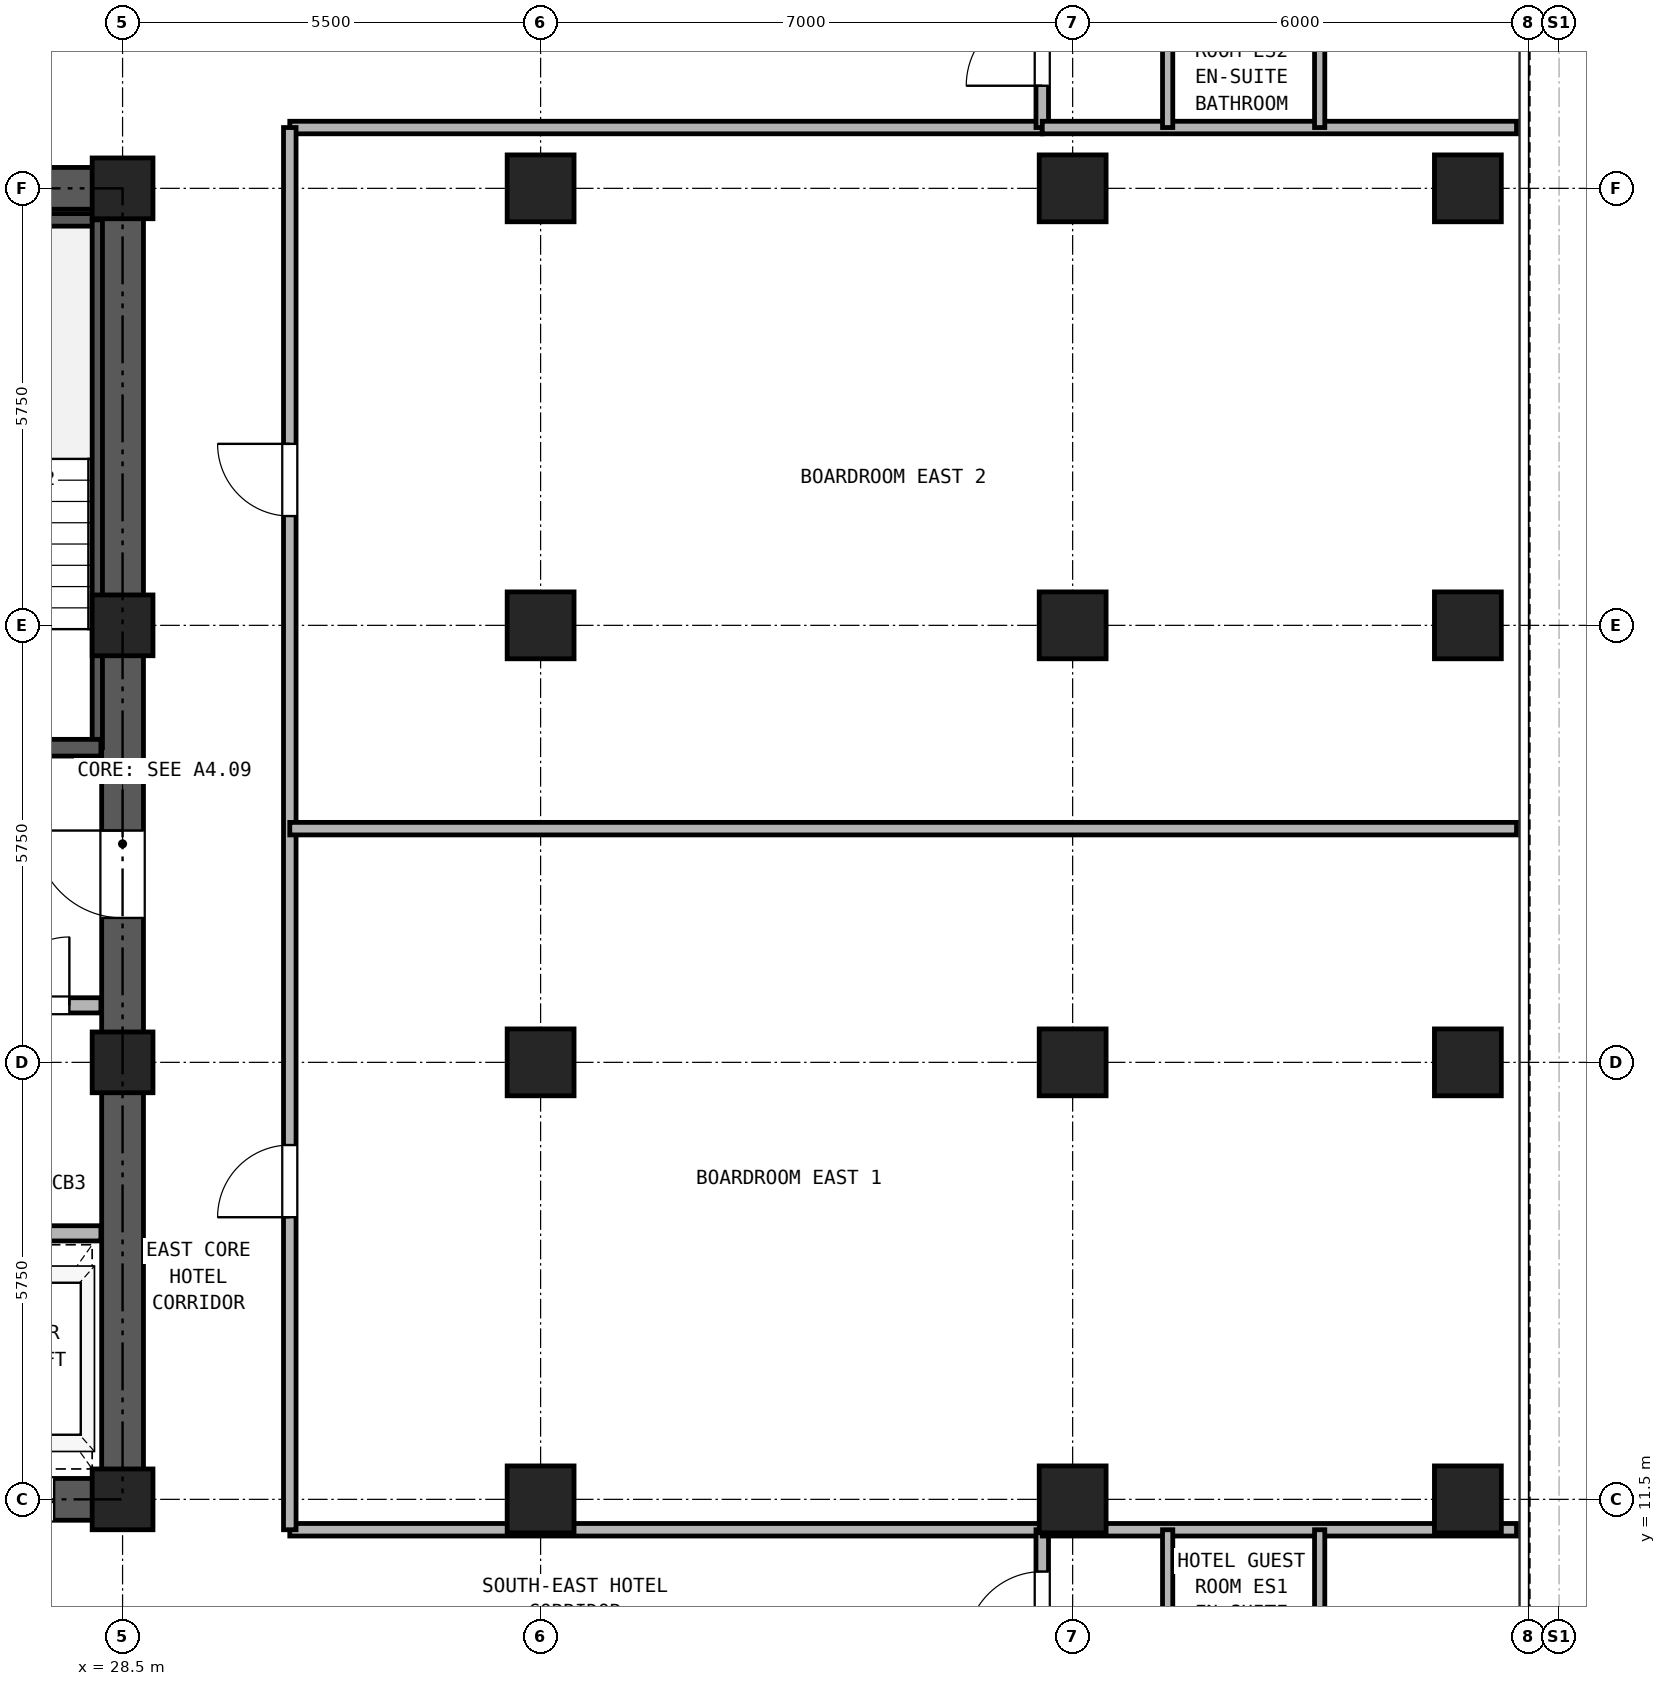
"""IFC4 building model, lengths in metres.
Left out: names, types, materials, properties, quantities, classifications, styles, units other than length and angle.
Written with IfcOpenShell. Run it as: python <this file> out.ifc"""

import sys

from ifc_helpers import new_model, si_unit, direction, frame, frame_2d, origin, origin_2d, place, context, subcontext, project, spatial, rectangle, hollow_rectangle, extrude, source, transform, mapped, element, fill, save


model = new_model("IFC4")
c1 = context("Model", 3, precision=1e-05, world=origin(), true_north=direction((0.0, 1.0)))
c2 = subcontext(c1, "Body", "Model", "MODEL_VIEW")
j1 = project(units=[si_unit("LENGTHUNIT", "METRE"), si_unit("PLANEANGLEUNIT", "RADIAN")], contexts=[c1])
p1 = place(None, origin())
s1 = spatial("IfcSite", under=j1, at=p1, CompositionType="ELEMENT")
p2 = place(p1, origin())
s2 = spatial("IfcBuilding", under=s1, at=p2, CompositionType="ELEMENT")
p3 = place(p2, frame((0.0, 0.0, 108.7)))
s3 = spatial("IfcBuildingStorey", under=s2, at=p3, CompositionType="ELEMENT", Elevation=108.7)
m1 = source(origin(), c2, "Body", "SweptSolid", [
    extrude(hollow_rectangle(XDim=0.88, YDim=0.88, WallThickness=0.05, at=origin_2d()), origin(), (0.0, 0.0, 1.0), 2.95),
])
for number, where, z_axis, x_axis in (
    (1, (46.2, 11.5, 0.0), (0.0, 0.0, 1.0), (1.0, 0.0, 0.0)),
    (2, (46.2, 17.25, 0.0), (0.0, 0.0, 1.0), (1.0, 0.0, 0.0)),
    (3, (46.2, 23.0, 0.0), (0.0, 0.0, 1.0), (1.0, 0.0, 0.0)),
    (4, (46.2, 28.75, 0.0), (0.0, 0.0, 1.0), (1.0, 0.0, 0.0)),
):
    element("IfcColumn", number, at=place(p3, frame(where, z_axis=z_axis, x_axis=x_axis)), inside=s3, PredefinedType="COLUMN", context=c2, shape_type="MappedRepresentation", body=[
        mapped(m1, transform((0.0, 0.0, 0.0), x_axis=(1.0, 0.0, 0.0), y_axis=(0.0, 1.0, 0.0), z_axis=(0.0, 0.0, 1.0), scale=1.0)),
    ])
m2 = source(origin(), c2, "Body", "SweptSolid", [
    extrude(hollow_rectangle(XDim=0.8, YDim=0.8, WallThickness=0.045, at=origin_2d()), origin(), (0.0, 0.0, 1.0), 2.95),
])
for number, where, z_axis, x_axis in (
    (5, (28.5, 11.5, 0.0), (0.0, 0.0, 1.0), (1.0, 0.0, 0.0)),
    (6, (28.5, 17.25, 0.0), (0.0, 0.0, 1.0), (1.0, 0.0, 0.0)),
    (7, (28.5, 23.0, 0.0), (0.0, 0.0, 1.0), (1.0, 0.0, 0.0)),
    (8, (28.5, 28.75, 0.0), (0.0, 0.0, 1.0), (1.0, 0.0, 0.0)),
):
    element("IfcColumn", number, at=place(p3, frame(where, z_axis=z_axis, x_axis=x_axis)), inside=s3, PredefinedType="COLUMN", context=c2, shape_type="MappedRepresentation", body=[
        mapped(m2, transform((0.0, 0.0, 0.0), x_axis=(1.0, 0.0, 0.0), y_axis=(0.0, 1.0, 0.0), z_axis=(0.0, 0.0, 1.0), scale=1.0)),
    ])
for number, where, z_axis, x_axis in (
    (9, (34.0, 11.5, 0.0), (0.0, 0.0, 1.0), (1.0, 0.0, 0.0)),
    (10, (34.0, 17.25, 0.0), (0.0, 0.0, 1.0), (1.0, 0.0, 0.0)),
    (11, (34.0, 23.0, 0.0), (0.0, 0.0, 1.0), (1.0, 0.0, 0.0)),
    (12, (34.0, 28.75, 0.0), (0.0, 0.0, 1.0), (1.0, 0.0, 0.0)),
    (13, (41.0, 11.5, 0.0), (0.0, 0.0, 1.0), (1.0, 0.0, 0.0)),
    (14, (41.0, 17.25, 0.0), (0.0, 0.0, 1.0), (1.0, 0.0, 0.0)),
    (15, (41.0, 23.0, 0.0), (0.0, 0.0, 1.0), (1.0, 0.0, 0.0)),
    (16, (41.0, 28.75, 0.0), (0.0, 0.0, 1.0), (1.0, 0.0, 0.0)),
):
    element("IfcColumn", number, at=place(p3, frame(where, z_axis=z_axis, x_axis=x_axis)), inside=s3, PredefinedType="COLUMN", context=c2, shape_type="MappedRepresentation", body=[
        mapped(m1, transform((0.0, 0.0, 0.0), x_axis=(1.0, 0.0, 0.0), y_axis=(0.0, 1.0, 0.0), z_axis=(0.0, 0.0, 1.0), scale=1.0)),
    ])
p4 = place(p3, frame((18.225, 11.5, 0.0), z_axis=(0.0, 0.0, 1.0), x_axis=(1.0, 0.0, 0.0)))
e17 = element("IfcWall", 17, at=p4, inside=s3, PredefinedType="SHEAR", context=c2, shape_type="SweptSolid", body=[
    extrude(rectangle(XDim=10.55, YDim=0.55, at=frame_2d((5.275, 0.0))), origin(), (0.0, 0.0, 1.0), 2.95),
])
p5 = place(p4, frame((2.375, 0.0, 0.0)))
e18 = element("IfcOpeningElement", 18, at=p5, cuts=e17, PredefinedType="OPENING", context=c2, shape_type="SweptSolid", body=[
    extrude(rectangle(XDim=0.95, YDim=2.15, at=frame_2d((0.475, 1.075))), frame((0.0, 0.285, 0.0), z_axis=(0.0, -1.0, 0.0), x_axis=(1.0, 0.0, 0.0)), (0.0, 0.0, 1.0), 0.57),
])
p6 = place(p4, frame((5.875, 0.0, 0.0)))
e19 = element("IfcOpeningElement", 19, at=p6, cuts=e17, PredefinedType="OPENING", context=c2, shape_type="SweptSolid", body=[
    extrude(rectangle(XDim=1.1, YDim=2.25, at=frame_2d((0.55, 1.125))), frame((0.0, 0.285, 0.0), z_axis=(0.0, -1.0, 0.0), x_axis=(1.0, 0.0, 0.0)), (0.0, 0.0, 1.0), 0.57),
])
p7 = place(p4, frame((8.275, 0.0, 0.0)))
e20 = element("IfcOpeningElement", 20, at=p7, cuts=e17, PredefinedType="OPENING", context=c2, shape_type="SweptSolid", body=[
    extrude(rectangle(XDim=1.1, YDim=2.25, at=frame_2d((0.55, 1.125))), frame((0.0, 0.285, 0.0), z_axis=(0.0, -1.0, 0.0), x_axis=(1.0, 0.0, 0.0)), (0.0, 0.0, 1.0), 0.57),
])
p8 = place(p3, frame((18.225, 28.75, 0.0), z_axis=(0.0, 0.0, 1.0), x_axis=(1.0, 0.0, 0.0)))
e21 = element("IfcWall", 21, at=p8, inside=s3, PredefinedType="SHEAR", context=c2, shape_type="SweptSolid", body=[
    extrude(rectangle(XDim=10.55, YDim=0.55, at=frame_2d((5.275, 0.0))), origin(), (0.0, 0.0, 1.0), 2.95),
])
p9 = place(p8, frame((4.155, 0.0, 0.0)))
e22 = element("IfcOpeningElement", 22, at=p9, cuts=e21, PredefinedType="OPENING", context=c2, shape_type="SweptSolid", body=[
    extrude(rectangle(XDim=0.9, YDim=2.05, at=frame_2d((0.45, 1.025))), frame((0.0, 0.285, 0.0), z_axis=(0.0, -1.0, 0.0), x_axis=(1.0, 0.0, 0.0)), (0.0, 0.0, 1.0), 0.57),
])
p10 = place(p8, frame((5.695, 0.0, 0.0)))
e23 = element("IfcOpeningElement", 23, at=p10, cuts=e21, PredefinedType="OPENING", context=c2, shape_type="SweptSolid", body=[
    extrude(rectangle(XDim=0.9, YDim=2.05, at=frame_2d((0.45, 1.025))), frame((0.0, 0.285, 0.0), z_axis=(0.0, -1.0, 0.0), x_axis=(1.0, 0.0, 0.0)), (0.0, 0.0, 1.0), 0.57),
])
p11 = place(p3, frame((28.5, 11.775, 0.0), z_axis=(0.0, 0.0, 1.0), x_axis=(0.0, 1.0, 0.0)))
e24 = element("IfcWall", 24, at=p11, inside=s3, PredefinedType="SHEAR", context=c2, shape_type="SweptSolid", body=[
    extrude(rectangle(XDim=16.7, YDim=0.55, at=frame_2d((8.35, 0.0))), origin(), (0.0, 0.0, 1.0), 2.95),
])
p12 = place(p11, frame((7.375, 0.0, 0.0)))
e25 = element("IfcOpeningElement", 25, at=p12, cuts=e24, PredefinedType="OPENING", context=c2, shape_type="SweptSolid", body=[
    extrude(rectangle(XDim=1.15, YDim=2.2, at=frame_2d((0.575, 1.1))), frame((0.0, 0.285, 0.0), z_axis=(0.0, -1.0, 0.0), x_axis=(1.0, 0.0, 0.0)), (0.0, 0.0, 1.0), 0.57),
])
p13 = place(p3, frame((25.13, 28.335, 0.0), z_axis=(0.0, 0.0, 1.0), x_axis=(1.0, 0.0, 0.0)))
e26 = element("IfcWall", 26, at=p13, inside=s3, PredefinedType="PARTITIONING", context=c2, shape_type="SweptSolid", body=[
    extrude(rectangle(XDim=3.085, YDim=0.165, at=frame_2d((1.542, 0.0))), origin(), (0.0, 0.0, 1.0), 2.95),
])
p14 = place(p3, frame((28.167, 21.39, 0.0), z_axis=(0.0, 0.0, 1.0), x_axis=(0.0, 1.0, 0.0)))
e27 = element("IfcWall", 27, at=p14, inside=s3, PredefinedType="PARTITIONING", context=c2, shape_type="SweptSolid", body=[
    extrude(rectangle(XDim=6.945, YDim=0.135, at=frame_2d((3.473, 0.0))), origin(), (0.0, 0.0, 1.0), 2.95),
])
p15 = place(p3, frame((25.13, 21.39, 0.0), z_axis=(0.0, 0.0, 1.0), x_axis=(1.0, 0.0, 0.0)))
e28 = element("IfcWall", 28, at=p15, inside=s3, PredefinedType="SOLIDWALL", context=c2, shape_type="SweptSolid", body=[
    extrude(rectangle(XDim=3.085, YDim=0.22, at=frame_2d((1.542, 0.0))), origin(), (0.0, 0.0, 1.0), 2.95),
])
p16 = place(p15, frame((0.92, 0.0, 0.0)))
e29 = element("IfcOpeningElement", 29, at=p16, cuts=e28, PredefinedType="OPENING", context=c2, shape_type="SweptSolid", body=[
    extrude(rectangle(XDim=1.15, YDim=2.2, at=frame_2d((0.575, 1.1))), frame((0.0, 0.12, 0.0), z_axis=(0.0, -1.0, 0.0), x_axis=(1.0, 0.0, 0.0)), (0.0, 0.0, 1.0), 0.24),
])
p17 = place(p3, frame((18.785, 18.0, 0.0), z_axis=(0.0, 0.0, 1.0), x_axis=(1.0, 0.0, 0.0)))
e30 = element("IfcWall", 30, at=p17, inside=s3, PredefinedType="PARTITIONING", context=c2, shape_type="SweptSolid", body=[
    extrude(rectangle(XDim=9.43, YDim=0.2, at=frame_2d((4.715, 0.0))), origin(), (0.0, 0.0, 1.0), 2.95),
])
p18 = place(p17, frame((0.465, 0.0, 0.0)))
e31 = element("IfcOpeningElement", 31, at=p18, cuts=e30, PredefinedType="OPENING", context=c2, shape_type="SweptSolid", body=[
    extrude(rectangle(XDim=1.3, YDim=2.3, at=frame_2d((0.65, 1.15))), frame((0.0, 0.11, 0.0), z_axis=(0.0, -1.0, 0.0), x_axis=(1.0, 0.0, 0.0)), (0.0, 0.0, 1.0), 0.22),
])
p19 = place(p17, frame((2.565, 0.0, 0.0)))
e32 = element("IfcOpeningElement", 32, at=p19, cuts=e30, PredefinedType="OPENING", context=c2, shape_type="SweptSolid", body=[
    extrude(rectangle(XDim=1.3, YDim=2.3, at=frame_2d((0.65, 1.15))), frame((0.0, 0.11, 0.0), z_axis=(0.0, -1.0, 0.0), x_axis=(1.0, 0.0, 0.0)), (0.0, 0.0, 1.0), 0.22),
])
p20 = place(p17, frame((4.985, 0.0, 0.0)))
e33 = element("IfcOpeningElement", 33, at=p20, cuts=e30, PredefinedType="OPENING", context=c2, shape_type="SweptSolid", body=[
    extrude(rectangle(XDim=0.9, YDim=2.05, at=frame_2d((0.45, 1.025))), frame((0.0, 0.11, 0.0), z_axis=(0.0, -1.0, 0.0), x_axis=(1.0, 0.0, 0.0)), (0.0, 0.0, 1.0), 0.22),
])
p21 = place(p17, frame((8.115, 0.0, 0.0)))
e34 = element("IfcOpeningElement", 34, at=p21, cuts=e30, PredefinedType="OPENING", context=c2, shape_type="SweptSolid", body=[
    extrude(rectangle(XDim=0.9, YDim=2.05, at=frame_2d((0.45, 1.025))), frame((0.0, 0.11, 0.0), z_axis=(0.0, -1.0, 0.0), x_axis=(1.0, 0.0, 0.0)), (0.0, 0.0, 1.0), 0.22),
])
p22 = place(p3, frame((18.785, 15.0, 0.0), z_axis=(0.0, 0.0, 1.0), x_axis=(1.0, 0.0, 0.0)))
e35 = element("IfcWall", 35, at=p22, inside=s3, PredefinedType="PARTITIONING", context=c2, shape_type="SweptSolid", body=[
    extrude(rectangle(XDim=9.43, YDim=0.2, at=frame_2d((4.715, 0.0))), origin(), (0.0, 0.0, 1.0), 2.95),
])
for number, where, z_axis, x_axis in (
    (36, (30.7, 11.1, 0.0), (0.0, 0.0, 1.0), (1.0, 0.0, 0.0)),
    (37, (30.7, 29.55, 0.0), (0.0, 0.0, 1.0), (1.0, 0.0, 0.0)),
):
    element("IfcWall", number, at=place(p3, frame(where, z_axis=z_axis, x_axis=x_axis)), inside=s3, PredefinedType="PARTITIONING", context=c2, shape_type="SweptSolid", body=[
        extrude(rectangle(XDim=9.9, YDim=0.165, at=frame_2d((4.95, 0.0))), origin(), (0.0, 0.0, 1.0), 2.95),
    ])
p23 = place(p3, frame((30.7, 11.1, 0.0), z_axis=(0.0, 0.0, 1.0), x_axis=(0.0, 1.0, 0.0)))
e38 = element("IfcWall", 38, at=p23, inside=s3, PredefinedType="PARTITIONING", context=c2, shape_type="SweptSolid", body=[
    extrude(rectangle(XDim=18.45, YDim=0.165, at=frame_2d((9.225, 0.0))), origin(), (0.0, 0.0, 1.0), 2.95),
])
p24 = place(p23, frame((4.112, 0.0, 0.0)))
e39 = element("IfcOpeningElement", 39, at=p24, cuts=e38, PredefinedType="OPENING", context=c2, shape_type="SweptSolid", body=[
    extrude(rectangle(XDim=0.95, YDim=2.15, at=frame_2d((0.475, 1.075))), frame((0.0, 0.093, 0.0), z_axis=(0.0, -1.0, 0.0), x_axis=(1.0, 0.0, 0.0)), (0.0, 0.0, 1.0), 0.185),
])
p25 = place(p23, frame((13.338, 0.0, 0.0)))
e40 = element("IfcOpeningElement", 40, at=p25, cuts=e38, PredefinedType="OPENING", context=c2, shape_type="SweptSolid", body=[
    extrude(rectangle(XDim=0.95, YDim=2.15, at=frame_2d((0.475, 1.075))), frame((0.0, 0.093, 0.0), z_axis=(0.0, -1.0, 0.0), x_axis=(1.0, 0.0, 0.0)), (0.0, 0.0, 1.0), 0.185),
])
p26 = place(p3, frame((40.6, 0.16, 0.0), z_axis=(0.0, 0.0, 1.0), x_axis=(0.0, 1.0, 0.0)))
e41 = element("IfcWall", 41, at=p26, inside=s3, PredefinedType="PARTITIONING", context=c2, shape_type="SweptSolid", body=[
    extrude(rectangle(XDim=10.94, YDim=0.165, at=frame_2d((5.47, 0.0))), origin(), (0.0, 0.0, 1.0), 2.95),
])
p27 = place(p26, frame((9.39, 0.0, 0.0)))
e42 = element("IfcOpeningElement", 42, at=p27, cuts=e41, PredefinedType="OPENING", context=c2, shape_type="SweptSolid", body=[
    extrude(rectangle(XDim=1.0, YDim=2.15, at=frame_2d((0.5, 1.075))), frame((0.0, 0.093, 0.0), z_axis=(0.0, -1.0, 0.0), x_axis=(1.0, 0.0, 0.0)), (0.0, 0.0, 1.0), 0.185),
])
p28 = place(p3, frame((40.6, 29.55, 0.0), z_axis=(0.0, 0.0, 1.0), x_axis=(0.0, 1.0, 0.0)))
e43 = element("IfcWall", 43, at=p28, inside=s3, PredefinedType="PARTITIONING", context=c2, shape_type="SweptSolid", body=[
    extrude(rectangle(XDim=5.59, YDim=0.165, at=frame_2d((2.795, 0.0))), origin(), (0.0, 0.0, 1.0), 2.95),
])
p29 = place(p28, frame((0.55, 0.0, 0.0)))
e44 = element("IfcOpeningElement", 44, at=p29, cuts=e43, PredefinedType="OPENING", context=c2, shape_type="SweptSolid", body=[
    extrude(rectangle(XDim=1.0, YDim=2.15, at=frame_2d((0.5, 1.075))), frame((0.0, 0.093, 0.0), z_axis=(0.0, -1.0, 0.0), x_axis=(1.0, 0.0, 0.0)), (0.0, 0.0, 1.0), 0.185),
])
for number, where, z_axis, x_axis in (
    (45, (40.6, 11.1, 0.0), (0.0, 0.0, 1.0), (1.0, 0.0, 0.0)),
    (46, (40.6, 29.55, 0.0), (0.0, 0.0, 1.0), (1.0, 0.0, 0.0)),
):
    element("IfcWall", number, at=place(p3, frame(where, z_axis=z_axis, x_axis=x_axis)), inside=s3, PredefinedType="PARTITIONING", context=c2, shape_type="SweptSolid", body=[
        extrude(rectangle(XDim=6.24, YDim=0.165, at=frame_2d((3.12, 0.0))), origin(), (0.0, 0.0, 1.0), 2.95),
    ])
for number, where, z_axis, x_axis in (
    (47, (42.25, 9.0, 0.0), (0.0, 0.0, 1.0), (0.0, 1.0, 0.0)),
    (48, (44.25, 9.0, 0.0), (0.0, 0.0, 1.0), (0.0, 1.0, 0.0)),
):
    element("IfcWall", number, at=place(p3, frame(where, z_axis=z_axis, x_axis=x_axis)), inside=s3, PredefinedType="PARTITIONING", context=c2, shape_type="SweptSolid", body=[
        extrude(rectangle(XDim=2.1, YDim=0.135, at=frame_2d((1.05, 0.0))), origin(), (0.0, 0.0, 1.0), 2.95),
    ])
for number, where, z_axis, x_axis in (
    (49, (42.25, 29.55, 0.0), (0.0, 0.0, 1.0), (0.0, 1.0, 0.0)),
    (50, (44.25, 29.55, 0.0), (0.0, 0.0, 1.0), (0.0, 1.0, 0.0)),
):
    element("IfcWall", number, at=place(p3, frame(where, z_axis=z_axis, x_axis=x_axis)), inside=s3, PredefinedType="PARTITIONING", context=c2, shape_type="SweptSolid", body=[
        extrude(rectangle(XDim=2.1, YDim=0.135, at=frame_2d((1.05, 0.0))), origin(), (0.0, 0.0, 1.0), 2.95),
    ])
p30 = place(p3, frame((30.7, 20.325, 0.0), z_axis=(0.0, 0.0, 1.0), x_axis=(1.0, 0.0, 0.0)))
e51 = element("IfcWall", 51, at=p30, inside=s3, PredefinedType="PARTITIONING", context=c2, shape_type="SweptSolid", body=[
    extrude(rectangle(XDim=16.14, YDim=0.165, at=frame_2d((8.07, 0.0))), origin(), (0.0, 0.0, 1.0), 2.583),
])
p31 = place(p21, frame((0.9, 0.0, 0.0), z_axis=(0.0, 0.0, 1.0), x_axis=(-1.0, 0.0, 0.0)))
e52 = element("IfcDoor", 52, at=p31, inside=s3, OperationType="SINGLE_SWING_RIGHT", PredefinedType="DOOR", context=c2, shape_type="SweptSolid", body=[
    extrude(rectangle(XDim=0.9, YDim=2.05, at=frame_2d((0.45, 1.025))), frame((0.0, 0.025, 0.0), z_axis=(0.0, -1.0, 0.0), x_axis=(1.0, 0.0, 0.0)), (0.0, 0.0, 1.0), 0.05),
])
fill(e34, e52)
p32 = place(p12, origin())
e53 = element("IfcDoor", 53, at=p32, inside=s3, OperationType="SINGLE_SWING_RIGHT", PredefinedType="DOOR", context=c2, shape_type="SweptSolid", body=[
    extrude(rectangle(XDim=1.15, YDim=2.2, at=frame_2d((0.575, 1.1))), frame((0.0, 0.025, 0.0), z_axis=(0.0, -1.0, 0.0), x_axis=(1.0, 0.0, 0.0)), (0.0, 0.0, 1.0), 0.05),
])
fill(e25, e53)
p33 = place(p7, frame((1.1, 0.0, 0.0), z_axis=(0.0, 0.0, 1.0), x_axis=(-1.0, 0.0, 0.0)))
e54 = element("IfcDoor", 54, at=p33, inside=s3, OperationType="DOUBLE_DOOR_SLIDING", PredefinedType="DOOR", context=c2, shape_type="SweptSolid", body=[
    extrude(rectangle(XDim=1.1, YDim=2.25, at=frame_2d((0.55, 1.125))), frame((0.0, 0.025, 0.0), z_axis=(0.0, -1.0, 0.0), x_axis=(1.0, 0.0, 0.0)), (0.0, 0.0, 1.0), 0.05),
])
fill(e20, e54)
p34 = place(p27, frame((1.0, 0.0, 0.0), z_axis=(0.0, 0.0, 1.0), x_axis=(-1.0, 0.0, 0.0)))
e55 = element("IfcDoor", 55, at=p34, inside=s3, OperationType="SINGLE_SWING_LEFT", PredefinedType="DOOR", context=c2, shape_type="SweptSolid", body=[
    extrude(rectangle(XDim=1.0, YDim=2.15, at=frame_2d((0.5, 1.075))), frame((0.0, 0.025, 0.0), z_axis=(0.0, -1.0, 0.0), x_axis=(1.0, 0.0, 0.0)), (0.0, 0.0, 1.0), 0.05),
])
fill(e42, e55)
p35 = place(p29, frame((1.0, 0.0, 0.0), z_axis=(0.0, 0.0, 1.0), x_axis=(-1.0, 0.0, 0.0)))
e56 = element("IfcDoor", 56, at=p35, inside=s3, OperationType="SINGLE_SWING_LEFT", PredefinedType="DOOR", context=c2, shape_type="SweptSolid", body=[
    extrude(rectangle(XDim=1.0, YDim=2.15, at=frame_2d((0.5, 1.075))), frame((0.0, 0.025, 0.0), z_axis=(0.0, -1.0, 0.0), x_axis=(1.0, 0.0, 0.0)), (0.0, 0.0, 1.0), 0.05),
])
fill(e44, e56)
p36 = place(p24, origin())
e57 = element("IfcDoor", 57, at=p36, inside=s3, OperationType="SINGLE_SWING_LEFT", PredefinedType="DOOR", context=c2, shape_type="SweptSolid", body=[
    extrude(rectangle(XDim=0.95, YDim=2.15, at=frame_2d((0.475, 1.075))), frame((0.0, 0.025, 0.0), z_axis=(0.0, -1.0, 0.0), x_axis=(1.0, 0.0, 0.0)), (0.0, 0.0, 1.0), 0.05),
])
fill(e39, e57)
p37 = place(p25, origin())
e58 = element("IfcDoor", 58, at=p37, inside=s3, OperationType="SINGLE_SWING_RIGHT", PredefinedType="DOOR", context=c2, shape_type="SweptSolid", body=[
    extrude(rectangle(XDim=0.95, YDim=2.15, at=frame_2d((0.475, 1.075))), frame((0.0, 0.025, 0.0), z_axis=(0.0, -1.0, 0.0), x_axis=(1.0, 0.0, 0.0)), (0.0, 0.0, 1.0), 0.05),
])
fill(e40, e58)
save(model, sys.argv[1])
